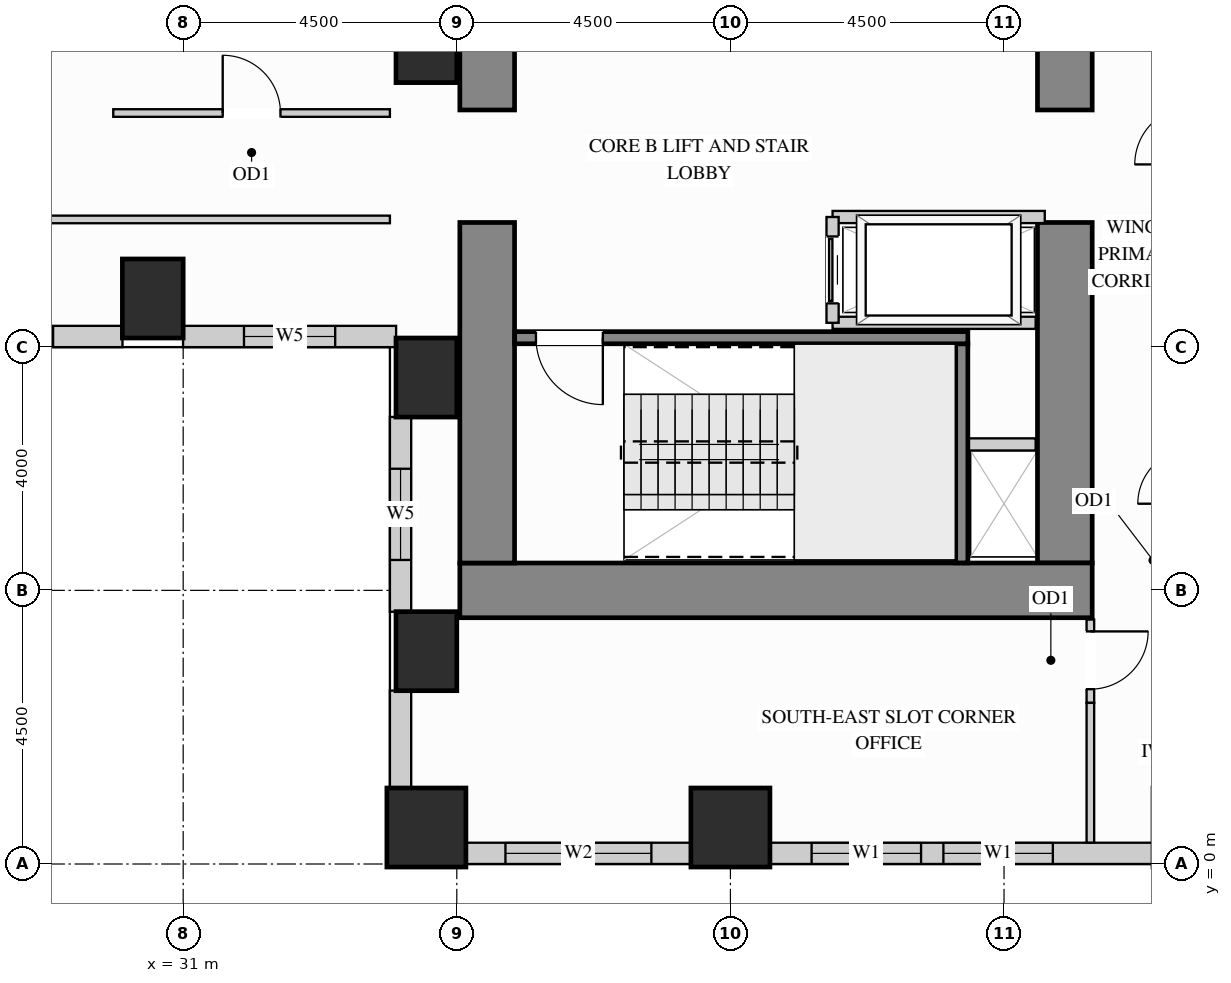
"""IFC4 building model, lengths in metres.
Left out: names, types, materials, properties, quantities, classifications, styles, units other than length and angle.
Written with IfcOpenShell. Run it as: python <this file> out.ifc"""

import sys

from ifc_helpers import new_model, si_unit, direction, frame, frame_2d, origin, origin_2d, place, context, subcontext, project, spatial, rectangle, extrude, source, transform, mapped, element, fill, save


model = new_model("IFC4")
c1 = context("Model", 3, precision=1e-05, world=origin(), true_north=direction((0.0, 1.0)))
c2 = subcontext(c1, "Body", "Model", "MODEL_VIEW")
j1 = project(units=[si_unit("LENGTHUNIT", "METRE"), si_unit("PLANEANGLEUNIT", "RADIAN")], contexts=[c1])
p1 = place(None, origin())
s1 = spatial("IfcSite", under=j1, at=p1, CompositionType="ELEMENT")
p2 = place(p1, origin())
s2 = spatial("IfcBuilding", under=s1, at=p2, CompositionType="ELEMENT")
p3 = place(p2, frame((0.0, 0.0, 65.7)))
s3 = spatial("IfcBuildingStorey", under=s2, at=p3, CompositionType="ELEMENT", Elevation=65.7)
m1 = source(origin(), c2, "Body", "SweptSolid", [
    extrude(rectangle(XDim=1.0, YDim=1.3, at=origin_2d()), origin(), (0.0, 0.0, 1.0), 3.38),
])
for number, where, z_axis, x_axis in (
    (1, (35.0, 13.5, 0.0), (0.0, 0.0, 1.0), (1.0, 0.0, 0.0)),
    (2, (35.0, 3.5, 0.0), (0.0, 0.0, 1.0), (1.0, 0.0, 0.0)),
    (3, (35.0, 8.0, 0.0), (0.0, 0.0, 1.0), (1.0, 0.0, 0.0)),
    (4, (30.5, 9.3, 0.0), (0.0, 0.0, 1.0), (1.0, 0.0, 0.0)),
):
    element("IfcColumn", number, at=place(p3, frame(where, z_axis=z_axis, x_axis=x_axis)), inside=s3, PredefinedType="COLUMN", context=c2, shape_type="MappedRepresentation", body=[
        mapped(m1, transform((0.0, 0.0, 0.0), x_axis=(1.0, 0.0, 0.0), y_axis=(0.0, 1.0, 0.0), z_axis=(0.0, 0.0, 1.0))),
    ])
m2 = source(origin(), c2, "Body", "SweptSolid", [
    extrude(rectangle(XDim=1.3, YDim=1.3, at=origin_2d()), origin(), (0.0, 0.0, 1.0), 3.38),
])
for number, where, z_axis, x_axis in (
    (5, (35.0, 0.6, 0.0), (0.0, 0.0, 1.0), (1.0, 0.0, 0.0)),
    (6, (40.0, 0.6, 0.0), (0.0, 0.0, 1.0), (1.0, 0.0, 0.0)),
):
    element("IfcColumn", number, at=place(p3, frame(where, z_axis=z_axis, x_axis=x_axis)), inside=s3, PredefinedType="COLUMN", context=c2, shape_type="MappedRepresentation", body=[
        mapped(m2, transform((0.0, 0.0, 0.0), x_axis=(1.0, 0.0, 0.0), y_axis=(0.0, 1.0, 0.0), z_axis=(0.0, 0.0, 1.0))),
    ])
m3 = source(origin(), c2, "Body", "SweptSolid", [
    extrude(rectangle(XDim=5.6, YDim=0.9, at=frame_2d((2.8, 0.0))), origin(), (0.0, 0.0, 1.0), 3.38),
])
p4 = place(p3, frame((45.5, 4.95, 0.0), z_axis=(0.0, 0.0, 1.0), x_axis=(0.0, 1.0, 0.0)))
e7 = element("IfcWall", 7, at=p4, inside=s3, PredefinedType="SHEAR", context=c2, shape_type="MappedRepresentation", body=[
    mapped(m3, transform((0.0, 0.0, 0.0), x_axis=(1.0, 0.0, 0.0), y_axis=(0.0, 1.0, 0.0), z_axis=(0.0, 0.0, 1.0))),
])
m4 = source(origin(), c2, "Body", "SweptSolid", [
    extrude(rectangle(XDim=3.65, YDim=0.9, at=frame_2d((1.825, 0.0))), origin(), (0.0, 0.0, 1.0), 3.38),
])
p5 = place(p3, frame((45.5, 12.4, 0.0), z_axis=(0.0, 0.0, 1.0), x_axis=(0.0, 1.0, 0.0)))
e8 = element("IfcWall", 8, at=p5, inside=s3, PredefinedType="SHEAR", context=c2, shape_type="MappedRepresentation", body=[
    mapped(m4, transform((0.0, 0.0, 0.0), x_axis=(1.0, 0.0, 0.0), y_axis=(0.0, 1.0, 0.0), z_axis=(0.0, 0.0, 1.0))),
])
m5 = source(origin(), c2, "Body", "SweptSolid", [
    extrude(rectangle(XDim=10.4, YDim=0.9, at=frame_2d((5.2, 0.0))), origin(), (0.0, 0.0, 1.0), 3.38),
])
p6 = place(p3, frame((35.55, 4.5, 0.0), z_axis=(0.0, 0.0, 1.0), x_axis=(1.0, 0.0, 0.0)))
e9 = element("IfcWall", 9, at=p6, inside=s3, PredefinedType="SHEAR", context=c2, shape_type="MappedRepresentation", body=[
    mapped(m5, transform((0.0, 0.0, 0.0), x_axis=(1.0, 0.0, 0.0), y_axis=(0.0, 1.0, 0.0), z_axis=(0.0, 0.0, 1.0))),
])
p7 = place(p3, frame((36.0, 4.95, 0.0), z_axis=(0.0, 0.0, 1.0), x_axis=(0.0, 1.0, 0.0)))
e10 = element("IfcWall", 10, at=p7, inside=s3, PredefinedType="SHEAR", context=c2, shape_type="MappedRepresentation", body=[
    mapped(m3, transform((0.0, 0.0, 0.0), x_axis=(1.0, 0.0, 0.0), y_axis=(0.0, 1.0, 0.0), z_axis=(0.0, 0.0, 1.0))),
])
p8 = place(p3, frame((36.0, 12.4, 0.0), z_axis=(0.0, 0.0, 1.0), x_axis=(0.0, 1.0, 0.0)))
e11 = element("IfcWall", 11, at=p8, inside=s3, PredefinedType="SHEAR", context=c2, shape_type="MappedRepresentation", body=[
    mapped(m4, transform((0.0, 0.0, 0.0), x_axis=(1.0, 0.0, 0.0), y_axis=(0.0, 1.0, 0.0), z_axis=(0.0, 0.0, 1.0))),
])
p9 = place(p3, frame((23.898, 8.675, 0.0), z_axis=(0.0, 0.0, 1.0), x_axis=(1.0, 0.0, 0.0)))
e12 = element("IfcWall", 12, at=p9, inside=s3, PredefinedType="SOLIDWALL", context=c2, shape_type="SweptSolid", body=[
    extrude(rectangle(XDim=6.104, YDim=0.35, at=frame_2d((3.052, 0.0))), origin(), (0.0, 0.0, 1.0), 3.365),
])
p10 = place(p9, frame((1.141, 0.0, 0.78)))
e13 = element("IfcOpeningElement", 13, at=p10, cuts=e12, PredefinedType="OPENING", context=c2, shape_type="SweptSolid", body=[
    extrude(rectangle(XDim=1.5, YDim=2.0, at=frame_2d((0.75, 1.0))), frame((0.0, 0.185, 0.0), z_axis=(0.0, -1.0, 0.0), x_axis=(1.0, 0.0, 0.0)), (0.0, 0.0, 1.0), 0.37),
])
p11 = place(p9, frame((3.463, 0.0, 0.78)))
e14 = element("IfcOpeningElement", 14, at=p11, cuts=e12, PredefinedType="OPENING", context=c2, shape_type="SweptSolid", body=[
    extrude(rectangle(XDim=1.5, YDim=2.0, at=frame_2d((0.75, 1.0))), frame((0.0, 0.185, 0.0), z_axis=(0.0, -1.0, 0.0), x_axis=(1.0, 0.0, 0.0)), (0.0, 0.0, 1.0), 0.37),
])
p12 = place(p3, frame((30.998, 8.675, 0.0), z_axis=(0.0, 0.0, 1.0), x_axis=(1.0, 0.0, 0.0)))
e15 = element("IfcWall", 15, at=p12, inside=s3, PredefinedType="SOLIDWALL", context=c2, shape_type="SweptSolid", body=[
    extrude(rectangle(XDim=3.504, YDim=0.35, at=frame_2d((1.752, 0.0))), origin(), (0.0, 0.0, 1.0), 3.365),
])
p13 = place(p12, frame((1.002, 0.0, 0.78)))
e16 = element("IfcOpeningElement", 16, at=p13, cuts=e15, PredefinedType="OPENING", context=c2, shape_type="SweptSolid", body=[
    extrude(rectangle(XDim=1.5, YDim=2.0, at=frame_2d((0.75, 1.0))), frame((0.0, 0.185, 0.0), z_axis=(0.0, -1.0, 0.0), x_axis=(1.0, 0.0, 0.0)), (0.0, 0.0, 1.0), 0.37),
])
p14 = place(p3, frame((34.575, 7.352, 0.0), z_axis=(0.0, 0.0, 1.0), x_axis=(0.0, -1.0, 0.0)))
e17 = element("IfcWall", 17, at=p14, inside=s3, PredefinedType="SOLIDWALL", context=c2, shape_type="SweptSolid", body=[
    extrude(rectangle(XDim=3.204, YDim=0.35, at=frame_2d((1.602, 0.0))), origin(), (0.0, 0.0, 1.0), 2.51),
])
p15 = place(p14, frame((0.852, 0.0, 0.78)))
e18 = element("IfcOpeningElement", 18, at=p15, cuts=e17, PredefinedType="OPENING", context=c2, shape_type="SweptSolid", body=[
    extrude(rectangle(XDim=1.5, YDim=1.55, at=frame_2d((0.75, 0.775))), frame((0.0, 0.185, 0.0), z_axis=(0.0, -1.0, 0.0), x_axis=(1.0, 0.0, 0.0)), (0.0, 0.0, 1.0), 0.37),
])
m6 = source(origin(), c2, "Body", "SweptSolid", [
    extrude(rectangle(XDim=1.604, YDim=0.35, at=frame_2d((0.802, 0.0))), origin(), (0.0, 0.0, 1.0), 2.51),
])
p16 = place(p3, frame((34.575, 2.852, 0.0), z_axis=(0.0, 0.0, 1.0), x_axis=(0.0, -1.0, 0.0)))
e19 = element("IfcWall", 19, at=p16, inside=s3, PredefinedType="SOLIDWALL", context=c2, shape_type="MappedRepresentation", body=[
    mapped(m6, transform((0.0, 0.0, 0.0), x_axis=(1.0, 0.0, 0.0), y_axis=(0.0, 1.0, 0.0), z_axis=(0.0, 0.0, 1.0))),
])
p17 = place(p3, frame((35.648, 0.175, 0.0), z_axis=(0.0, 0.0, 1.0), x_axis=(1.0, 0.0, 0.0)))
e20 = element("IfcWall", 20, at=p17, inside=s3, PredefinedType="SOLIDWALL", context=c2, shape_type="SweptSolid", body=[
    extrude(rectangle(XDim=3.704, YDim=0.35, at=frame_2d((1.852, 0.0))), origin(), (0.0, 0.0, 1.0), 2.51),
])
p18 = place(p17, frame((0.652, 0.0, 0.78)))
e21 = element("IfcOpeningElement", 21, at=p18, cuts=e20, PredefinedType="OPENING", context=c2, shape_type="SweptSolid", body=[
    extrude(rectangle(XDim=2.4, YDim=1.55, at=frame_2d((1.2, 0.775))), frame((0.0, 0.185, 0.0), z_axis=(0.0, -1.0, 0.0), x_axis=(1.0, 0.0, 0.0)), (0.0, 0.0, 1.0), 0.37),
])
p19 = place(p3, frame((40.648, 0.175, 0.0), z_axis=(0.0, 0.0, 1.0), x_axis=(1.0, 0.0, 0.0)))
e22 = element("IfcWall", 22, at=p19, inside=s3, PredefinedType="SOLIDWALL", context=c2, shape_type="SweptSolid", body=[
    extrude(rectangle(XDim=6.304, YDim=0.35, at=frame_2d((3.152, 0.0))), origin(), (0.0, 0.0, 1.0), 2.51),
])
p20 = place(p19, frame((0.687, 0.0, 0.78)))
e23 = element("IfcOpeningElement", 23, at=p20, cuts=e22, PredefinedType="OPENING", context=c2, shape_type="SweptSolid", body=[
    extrude(rectangle(XDim=1.8, YDim=1.55, at=frame_2d((0.9, 0.775))), frame((0.0, 0.185, 0.0), z_axis=(0.0, -1.0, 0.0), x_axis=(1.0, 0.0, 0.0)), (0.0, 0.0, 1.0), 0.37),
])
p21 = place(p19, frame((2.855, 0.0, 0.78)))
e24 = element("IfcOpeningElement", 24, at=p21, cuts=e22, PredefinedType="OPENING", context=c2, shape_type="SweptSolid", body=[
    extrude(rectangle(XDim=1.8, YDim=1.55, at=frame_2d((0.9, 0.775))), frame((0.0, 0.185, 0.0), z_axis=(0.0, -1.0, 0.0), x_axis=(1.0, 0.0, 0.0)), (0.0, 0.0, 1.0), 0.37),
])
p22 = place(p3, frame((45.92, 2.65, 0.0), z_axis=(0.0, 0.0, 1.0), x_axis=(0.0, 1.0, 0.0)))
e25 = element("IfcWall", 25, at=p22, inside=s3, PredefinedType="PARTITIONING", context=c2, shape_type="SweptSolid", body=[
    extrude(rectangle(XDim=1.37, YDim=0.125, at=frame_2d((0.685, 0.0))), origin(), (0.0, 0.0, 1.0), 3.365),
])
p23 = place(p22, frame((0.225, 0.0, 0.0)))
e26 = element("IfcOpeningElement", 26, at=p23, cuts=e25, PredefinedType="OPENING", context=c2, shape_type="SweptSolid", body=[
    extrude(rectangle(XDim=0.95, YDim=2.15, at=frame_2d((0.475, 1.075))), frame((0.0, 0.073, 0.0), z_axis=(0.0, -1.0, 0.0), x_axis=(1.0, 0.0, 0.0)), (0.0, 0.0, 1.0), 0.145),
])
m7 = source(origin(), c2, "Body", "SweptSolid", [
    extrude(rectangle(XDim=2.298, YDim=0.125, at=frame_2d((1.149, 0.0))), origin(), (0.0, 0.0, 1.0), 3.365),
])
p24 = place(p3, frame((45.92, 0.352, 0.0), z_axis=(0.0, 0.0, 1.0), x_axis=(0.0, 1.0, 0.0)))
e27 = element("IfcWall", 27, at=p24, inside=s3, PredefinedType="PARTITIONING", context=c2, shape_type="MappedRepresentation", body=[
    mapped(m7, transform((0.0, 0.0, 0.0), x_axis=(1.0, 0.0, 0.0), y_axis=(0.0, 1.0, 0.0), z_axis=(0.0, 0.0, 1.0))),
])
p25 = place(p3, frame((29.85, 12.35, 0.0), z_axis=(0.0, 0.0, 1.0), x_axis=(1.0, 0.0, 0.0)))
e28 = element("IfcWall", 28, at=p25, inside=s3, PredefinedType="PARTITIONING", context=c2, shape_type="SweptSolid", body=[
    extrude(rectangle(XDim=4.55, YDim=0.125, at=frame_2d((2.275, 0.0))), origin(), (0.0, 0.0, 1.0), 3.365),
])
p26 = place(p25, frame((1.8, 0.0, 0.0)))
e29 = element("IfcOpeningElement", 29, at=p26, cuts=e28, PredefinedType="OPENING", context=c2, shape_type="SweptSolid", body=[
    extrude(rectangle(XDim=0.95, YDim=2.15, at=frame_2d((0.475, 1.075))), frame((0.0, 0.073, 0.0), z_axis=(0.0, -1.0, 0.0), x_axis=(1.0, 0.0, 0.0)), (0.0, 0.0, 1.0), 0.145),
])
p27 = place(p3, frame((19.5, 10.6, 0.0), z_axis=(0.0, 0.0, 1.0), x_axis=(1.0, 0.0, 0.0)))
e30 = element("IfcWall", 30, at=p27, inside=s3, PredefinedType="PARTITIONING", context=c2, shape_type="SweptSolid", body=[
    extrude(rectangle(XDim=14.9, YDim=0.125, at=frame_2d((7.45, 0.0))), origin(), (0.0, 0.0, 1.0), 3.365),
])
p28 = place(p27, frame((6.975, 0.0, 0.0)))
e31 = element("IfcOpeningElement", 31, at=p28, cuts=e30, PredefinedType="OPENING", context=c2, shape_type="SweptSolid", body=[
    extrude(rectangle(XDim=0.95, YDim=2.15, at=frame_2d((0.475, 1.075))), frame((0.0, 0.073, 0.0), z_axis=(0.0, -1.0, 0.0), x_axis=(1.0, 0.0, 0.0)), (0.0, 0.0, 1.0), 0.145),
])
m8 = source(origin(), c2, "Body", "SweptSolid", [
    extrude(rectangle(XDim=1.17, YDim=0.2, at=frame_2d((0.585, 0.0))), origin(), (0.0, 0.0, 1.0), 3.365),
])
p29 = place(p3, frame((43.85, 6.9, 0.0), z_axis=(0.0, 0.0, 1.0), x_axis=(1.0, 0.0, 0.0)))
e32 = element("IfcWall", 32, at=p29, inside=s3, PredefinedType="PARTITIONING", context=c2, shape_type="MappedRepresentation", body=[
    mapped(m8, transform((0.0, 0.0, 0.0), x_axis=(1.0, 0.0, 0.0), y_axis=(0.0, 1.0, 0.0), z_axis=(0.0, 0.0, 1.0))),
])
m9 = source(origin(), c2, "Body", "SweptSolid", [
    extrude(rectangle(XDim=3.49, YDim=0.2, at=frame_2d((1.745, 0.0))), origin(), (0.0, 0.0, 1.0), 3.365),
])
p30 = place(p3, frame((41.68, 10.64, 0.0), z_axis=(0.0, 0.0, 1.0), x_axis=(1.0, 0.0, 0.0)))
e33 = element("IfcWall", 33, at=p30, inside=s3, PredefinedType="PARTITIONING", context=c2, shape_type="MappedRepresentation", body=[
    mapped(m9, transform((0.0, 0.0, 0.0), x_axis=(1.0, 0.0, 0.0), y_axis=(0.0, 1.0, 0.0), z_axis=(0.0, 0.0, 1.0))),
])
m10 = source(origin(), c2, "Body", "SweptSolid", [
    extrude(rectangle(XDim=3.34, YDim=0.2, at=frame_2d((1.67, 0.0))), origin(), (0.0, 0.0, 1.0), 3.365),
])
p31 = place(p3, frame((41.68, 8.9, 0.0), z_axis=(0.0, 0.0, 1.0), x_axis=(1.0, 0.0, 0.0)))
e34 = element("IfcWall", 34, at=p31, inside=s3, PredefinedType="PARTITIONING", context=c2, shape_type="MappedRepresentation", body=[
    mapped(m10, transform((0.0, 0.0, 0.0), x_axis=(1.0, 0.0, 0.0), y_axis=(0.0, 1.0, 0.0), z_axis=(0.0, 0.0, 1.0))),
])
p32 = place(p3, frame((41.68, 8.9, 0.0), z_axis=(0.0, 0.0, 1.0), x_axis=(0.0, 1.0, 0.0)))
e35 = element("IfcWall", 35, at=p32, inside=s3, PredefinedType="PARTITIONING", context=c2, shape_type="SweptSolid", body=[
    extrude(rectangle(XDim=1.74, YDim=0.2, at=frame_2d((0.87, 0.0))), origin(), (0.0, 0.0, 1.0), 3.365),
])
p33 = place(p32, frame((0.32, 0.0, 0.0)))
e36 = element("IfcOpeningElement", 36, at=p33, cuts=e35, PredefinedType="OPENING", context=c2, shape_type="SweptSolid", body=[
    extrude(rectangle(XDim=1.1, YDim=2.2, at=frame_2d((0.55, 1.1))), frame((0.0, 0.11, 0.0), z_axis=(0.0, -1.0, 0.0), x_axis=(1.0, 0.0, 0.0)), (0.0, 0.0, 1.0), 0.22),
])
m11 = source(origin(), c2, "Body", "SweptSolid", [
    extrude(rectangle(XDim=3.603, YDim=0.2, at=frame_2d((1.802, 0.0))), origin(), (0.0, 0.0, 1.0), 3.38),
])
p34 = place(p3, frame((43.805, 4.952, 0.0), z_axis=(0.0, 0.0, 1.0), x_axis=(0.0, 1.0, 0.0)))
e37 = element("IfcWall", 37, at=p34, inside=s3, PredefinedType="SHEAR", context=c2, shape_type="MappedRepresentation", body=[
    mapped(m11, transform((0.0, 0.0, 0.0), x_axis=(1.0, 0.0, 0.0), y_axis=(0.0, 1.0, 0.0), z_axis=(0.0, 0.0, 1.0))),
])
p35 = place(p3, frame((36.452, 8.655, 0.0), z_axis=(0.0, 0.0, 1.0), x_axis=(1.0, 0.0, 0.0)))
e38 = element("IfcWall", 38, at=p35, inside=s3, PredefinedType="SHEAR", context=c2, shape_type="SweptSolid", body=[
    extrude(rectangle(XDim=7.453, YDim=0.2, at=frame_2d((3.727, 0.0))), origin(), (0.0, 0.0, 1.0), 3.38),
])
p36 = place(p35, frame((0.35, 0.0, 0.0)))
e39 = element("IfcOpeningElement", 39, at=p36, cuts=e38, PredefinedType="OPENING", context=c2, shape_type="SweptSolid", body=[
    extrude(rectangle(XDim=1.1, YDim=2.15, at=frame_2d((0.55, 1.075))), frame((0.0, 0.11, 0.0), z_axis=(0.0, -1.0, 0.0), x_axis=(1.0, 0.0, 0.0)), (0.0, 0.0, 1.0), 0.22),
])
m12 = source(origin(), c2, "Body", "SweptSolid", [
    extrude(rectangle(XDim=1.1, YDim=2.2, at=frame_2d((0.55, 1.1))), frame((0.0, 0.025, 0.0), z_axis=(0.0, -1.0, 0.0), x_axis=(1.0, 0.0, 0.0)), (0.0, 0.0, 1.0), 0.05),
])
p37 = place(p33, origin())
e40 = element("IfcDoor", 40, at=p37, inside=s3, OperationType="SLIDING_TO_LEFT", PredefinedType="DOOR", context=c2, shape_type="MappedRepresentation", body=[
    mapped(m12, transform((0.0, 0.0, 0.0), x_axis=(1.0, 0.0, 0.0), y_axis=(0.0, 1.0, 0.0), z_axis=(0.0, 0.0, 1.0))),
])
fill(e36, e40)
m13 = source(origin(), c2, "Body", "SweptSolid", [
    extrude(rectangle(XDim=0.95, YDim=2.15, at=frame_2d((0.475, 1.075))), frame((0.0, 0.025, 0.0), z_axis=(0.0, -1.0, 0.0), x_axis=(1.0, 0.0, 0.0)), (0.0, 0.0, 1.0), 0.05),
])
p38 = place(p23, origin())
e41 = element("IfcDoor", 41, at=p38, inside=s3, OperationType="SINGLE_SWING_RIGHT", PredefinedType="DOOR", context=c2, shape_type="MappedRepresentation", body=[
    mapped(m13, transform((0.0, 0.0, 0.0), x_axis=(1.0, 0.0, 0.0), y_axis=(0.0, 1.0, 0.0), z_axis=(0.0, 0.0, 1.0))),
])
fill(e26, e41)
p39 = place(p26, origin())
e42 = element("IfcDoor", 42, at=p39, inside=s3, OperationType="SINGLE_SWING_LEFT", PredefinedType="DOOR", context=c2, shape_type="MappedRepresentation", body=[
    mapped(m13, transform((0.0, 0.0, 0.0), x_axis=(1.0, 0.0, 0.0), y_axis=(0.0, 1.0, 0.0), z_axis=(0.0, 0.0, 1.0))),
])
fill(e29, e42)
m14 = source(origin(), c2, "Body", "SweptSolid", [
    extrude(rectangle(XDim=1.1, YDim=2.15, at=frame_2d((0.55, 1.075))), frame((0.0, 0.025, 0.0), z_axis=(0.0, -1.0, 0.0), x_axis=(1.0, 0.0, 0.0)), (0.0, 0.0, 1.0), 0.05),
])
p40 = place(p36, origin())
e43 = element("IfcDoor", 43, at=p40, inside=s3, OperationType="SINGLE_SWING_RIGHT", PredefinedType="DOOR", context=c2, shape_type="MappedRepresentation", body=[
    mapped(m14, transform((0.0, 0.0, 0.0), x_axis=(1.0, 0.0, 0.0), y_axis=(0.0, 1.0, 0.0), z_axis=(0.0, 0.0, 1.0))),
])
fill(e39, e43)
m15 = source(origin(), c2, "Body", "SweptSolid", [
    extrude(rectangle(XDim=1.8, YDim=1.55, at=frame_2d((0.9, 0.775))), frame((0.0, 0.03, 0.0), z_axis=(0.0, -1.0, 0.0), x_axis=(1.0, 0.0, 0.0)), (0.0, 0.0, 1.0), 0.06),
])
p41 = place(p20, origin())
e44 = element("IfcWindow", 44, at=p41, inside=s3, PartitioningType="SINGLE_PANEL", PredefinedType="WINDOW", context=c2, shape_type="MappedRepresentation", body=[
    mapped(m15, transform((0.0, 0.0, 0.0), x_axis=(1.0, 0.0, 0.0), y_axis=(0.0, 1.0, 0.0), z_axis=(0.0, 0.0, 1.0))),
])
fill(e23, e44)
p42 = place(p21, origin())
e45 = element("IfcWindow", 45, at=p42, inside=s3, PartitioningType="SINGLE_PANEL", PredefinedType="WINDOW", context=c2, shape_type="MappedRepresentation", body=[
    mapped(m15, transform((0.0, 0.0, 0.0), x_axis=(1.0, 0.0, 0.0), y_axis=(0.0, 1.0, 0.0), z_axis=(0.0, 0.0, 1.0))),
])
fill(e24, e45)
m16 = source(origin(), c2, "Body", "SweptSolid", [
    extrude(rectangle(XDim=2.4, YDim=1.55, at=frame_2d((1.2, 0.775))), frame((0.0, 0.03, 0.0), z_axis=(0.0, -1.0, 0.0), x_axis=(1.0, 0.0, 0.0)), (0.0, 0.0, 1.0), 0.06),
])
p43 = place(p18, origin())
e46 = element("IfcWindow", 46, at=p43, inside=s3, PartitioningType="SINGLE_PANEL", PredefinedType="WINDOW", context=c2, shape_type="MappedRepresentation", body=[
    mapped(m16, transform((0.0, 0.0, 0.0), x_axis=(1.0, 0.0, 0.0), y_axis=(0.0, 1.0, 0.0), z_axis=(0.0, 0.0, 1.0))),
])
fill(e21, e46)
m17 = source(origin(), c2, "Body", "SweptSolid", [
    extrude(rectangle(XDim=1.5, YDim=2.0, at=frame_2d((0.75, 1.0))), frame((0.0, 0.03, 0.0), z_axis=(0.0, -1.0, 0.0), x_axis=(1.0, 0.0, 0.0)), (0.0, 0.0, 1.0), 0.06),
])
p44 = place(p11, origin())
e47 = element("IfcWindow", 47, at=p44, inside=s3, PartitioningType="SINGLE_PANEL", PredefinedType="WINDOW", context=c2, shape_type="MappedRepresentation", body=[
    mapped(m17, transform((0.0, 0.0, 0.0), x_axis=(1.0, 0.0, 0.0), y_axis=(0.0, 1.0, 0.0), z_axis=(0.0, 0.0, 1.0))),
])
fill(e14, e47)
p45 = place(p13, origin())
e48 = element("IfcWindow", 48, at=p45, inside=s3, PartitioningType="SINGLE_PANEL", PredefinedType="WINDOW", context=c2, shape_type="MappedRepresentation", body=[
    mapped(m17, transform((0.0, 0.0, 0.0), x_axis=(1.0, 0.0, 0.0), y_axis=(0.0, 1.0, 0.0), z_axis=(0.0, 0.0, 1.0))),
])
fill(e16, e48)
m18 = source(origin(), c2, "Body", "SweptSolid", [
    extrude(rectangle(XDim=1.5, YDim=1.55, at=frame_2d((0.75, 0.775))), frame((0.0, 0.03, 0.0), z_axis=(0.0, -1.0, 0.0), x_axis=(1.0, 0.0, 0.0)), (0.0, 0.0, 1.0), 0.06),
])
p46 = place(p15, origin())
e49 = element("IfcWindow", 49, at=p46, inside=s3, PartitioningType="SINGLE_PANEL", PredefinedType="WINDOW", context=c2, shape_type="MappedRepresentation", body=[
    mapped(m18, transform((0.0, 0.0, 0.0), x_axis=(1.0, 0.0, 0.0), y_axis=(0.0, 1.0, 0.0), z_axis=(0.0, 0.0, 1.0))),
])
fill(e18, e49)
save(model, sys.argv[1])
